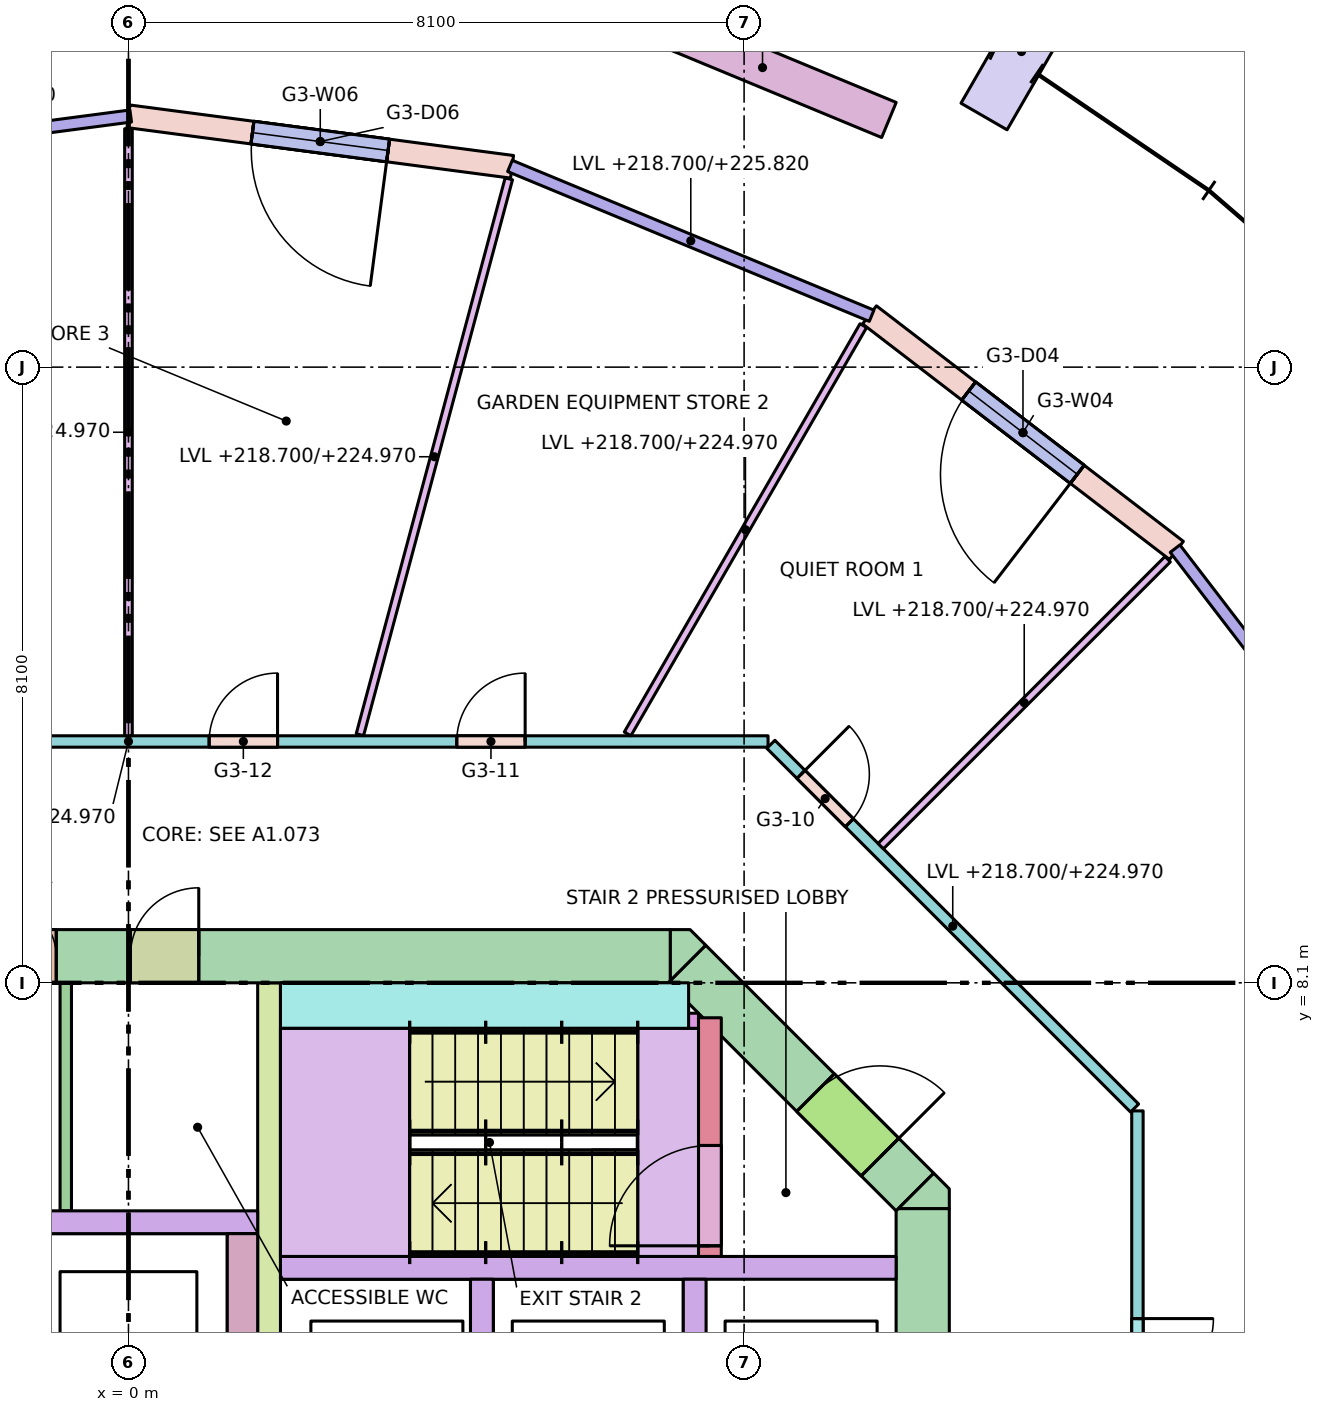
"""IFC4 building model, lengths in metres.
Left out: names, types, materials, properties, quantities, classifications, styles, units other than length and angle.
Written with IfcOpenShell. Run it as: python <this file> out.ifc"""

import sys

from ifc_helpers import new_model, si_unit, direction, frame, frame_2d, origin, origin_2d, place, context, subcontext, project, spatial, polyline, rectangle, outline, extrude, element, fill, save


model = new_model("IFC4")
c1 = context("Model", 3, precision=1e-05, world=origin(), true_north=direction((0.0, 1.0)))
c2 = subcontext(c1, "Body", "Model", "MODEL_VIEW")
j1 = project(units=[si_unit("LENGTHUNIT", "METRE"), si_unit("PLANEANGLEUNIT", "RADIAN")], contexts=[c1])
p1 = place(None, origin())
s1 = spatial("IfcSite", under=j1, at=p1, CompositionType="ELEMENT")
p2 = place(p1, origin())
s2 = spatial("IfcBuilding", under=s1, at=p2, CompositionType="ELEMENT")
p3 = place(p2, frame((0.0, 0.0, 218.7)))
s3 = spatial("IfcBuildingStorey", under=s2, at=p3, CompositionType="ELEMENT", Elevation=218.7)
p4 = place(p3, frame((11.505, 19.927, 0.067), z_axis=(0.066927607381, 0.115974555477, 0.990994751677), x_axis=(-0.866123480438, 0.499830087764, 0.0)))
e1 = element("IfcColumn", 1, at=p4, inside=s3, PredefinedType="COLUMN", context=c2, shape_type="SweptSolid", body=[
    extrude(rectangle(XDim=0.7, YDim=1.0, at=origin_2d()), origin(), (0.0, 0.0, 1.0), 7.332),
])
p5 = place(p3, frame((-7.13, 8.45, -0.28), z_axis=(0.0, 0.0, 1.0), x_axis=(1.0, 0.0, 0.0)))
e2 = element("IfcWall", 2, at=p5, inside=s3, PredefinedType="SHEAR", context=c2, shape_type="SweptSolid", body=[
    extrude(rectangle(XDim=14.26, YDim=0.7, at=frame_2d((7.13, 0.0))), origin(), (0.0, 0.0, 1.0), 7.4),
])
p6 = place(p5, frame((5.48, 0.0, 0.28)))
e3 = element("IfcOpeningElement", 3, at=p6, cuts=e2, PredefinedType="OPENING", context=c2, shape_type="SweptSolid", body=[
    extrude(rectangle(XDim=0.7, YDim=2.1, at=frame_2d((0.35, 1.05))), frame((0.0, 0.36, 0.0), z_axis=(0.0, -1.0, 0.0), x_axis=(1.0, 0.0, 0.0)), (0.0, 0.0, 1.0), 0.72),
])
p7 = place(p5, frame((7.155, 0.0, 0.28)))
e4 = element("IfcOpeningElement", 4, at=p7, cuts=e2, PredefinedType="OPENING", context=c2, shape_type="SweptSolid", body=[
    extrude(rectangle(XDim=0.9, YDim=2.1, at=frame_2d((0.45, 1.05))), frame((0.0, 0.36, 0.0), z_axis=(0.0, -1.0, 0.0), x_axis=(1.0, 0.0, 0.0)), (0.0, 0.0, 1.0), 0.72),
])
p8 = place(p3, frame((10.45, -5.13, -0.28), z_axis=(0.0, 0.0, 1.0), x_axis=(0.0, 1.0, 0.0)))
e5 = element("IfcWall", 5, at=p8, inside=s3, PredefinedType="SHEAR", context=c2, shape_type="SweptSolid", body=[
    extrude(rectangle(XDim=10.26, YDim=0.7, at=frame_2d((5.13, 0.0))), origin(), (0.0, 0.0, 1.0), 7.4),
])
p9 = place(p8, frame((4.13, 0.0, 0.28)))
e6 = element("IfcOpeningElement", 6, at=p9, cuts=e5, PredefinedType="OPENING", context=c2, shape_type="SweptSolid", body=[
    extrude(rectangle(XDim=2.0, YDim=2.1, at=frame_2d((1.0, 1.05))), frame((0.0, 0.36, 0.0), z_axis=(0.0, -1.0, 0.0), x_axis=(1.0, 0.0, 0.0)), (0.0, 0.0, 1.0), 0.72),
])
p10 = place(p3, frame((7.347, 8.347, -0.28), z_axis=(0.0, 0.0, 1.0), x_axis=(0.707106781187, -0.707106781187, 0.0)))
e7 = element("IfcWall", 7, at=p10, inside=s3, PredefinedType="SHEAR", context=c2, shape_type="SweptSolid", body=[
    extrude(rectangle(XDim=4.243, YDim=0.7, at=frame_2d((2.121, 0.0))), origin(), (0.0, 0.0, 1.0), 7.4),
])
p11 = place(p10, frame((2.393, 0.0, 0.28)))
e8 = element("IfcOpeningElement", 8, at=p11, cuts=e7, PredefinedType="OPENING", context=c2, shape_type="SweptSolid", body=[
    extrude(rectangle(XDim=1.2, YDim=2.1, at=frame_2d((0.6, 1.05))), frame((0.0, 0.36, 0.0), z_axis=(0.0, -1.0, 0.0), x_axis=(1.0, 0.0, 0.0)), (0.0, 0.0, 1.0), 0.72),
])
p12 = place(p3, frame((0.0, 0.0, -0.28)))
e9 = element("IfcWall", 9, at=p12, inside=s3, PredefinedType="SHEAR", context=c2, shape_type="SweptSolid", body=[
    extrude(outline(polyline([(10.8, 5.39), (10.8, 5.13), (10.8, 5.13), (10.13, 5.13), (10.595, 5.595), (10.595, 5.595), (10.595, 5.595), (10.8, 5.39)])), origin(), (0.0, 0.0, 1.0), 7.4),
])
p13 = place(p3, frame((0.0, 0.0, -0.28)))
e10 = element("IfcWall", 10, at=p13, inside=s3, PredefinedType="SHEAR", context=c2, shape_type="SweptSolid", body=[
    extrude(outline(polyline([(7.39, 8.8), (7.595, 8.595), (7.595, 8.595), (7.595, 8.595), (7.13, 8.13), (7.13, 8.8), (7.13, 8.8), (7.39, 8.8)])), origin(), (0.0, 0.0, 1.0), 7.4),
])
p14 = place(p3, frame((2.0, 4.35, 0.0), z_axis=(0.0, 0.0, 1.0), x_axis=(1.0, 0.0, 0.0)))
e11 = element("IfcWall", 11, at=p14, inside=s3, PredefinedType="SOLIDWALL", context=c2, shape_type="SweptSolid", body=[
    extrude(rectangle(XDim=8.1, YDim=0.3, at=frame_2d((4.05, 0.0))), origin(), (0.0, 0.0, 1.0), 7.12),
])
for number, where, z_axis, x_axis in (
    (12, (4.65, 1.8, 0.0), (0.0, 0.0, 1.0), (0.0, 1.0, 0.0)),
    (13, (7.45, 1.8, 0.0), (0.0, 0.0, 1.0), (0.0, 1.0, 0.0)),
):
    element("IfcWall", number, at=place(p3, frame(where, z_axis=z_axis, x_axis=x_axis)), inside=s3, PredefinedType="SOLIDWALL", context=c2, shape_type="SweptSolid", body=[
        extrude(rectangle(XDim=2.4, YDim=0.3, at=frame_2d((1.2, 0.0))), origin(), (0.0, 0.0, 1.0), 7.12),
    ])
p15 = place(p3, frame((1.85, 1.5, 0.0), z_axis=(0.0, 0.0, 1.0), x_axis=(0.0, 1.0, 0.0)))
e14 = element("IfcWall", 14, at=p15, inside=s3, PredefinedType="SHEAR", context=c2, shape_type="SweptSolid", body=[
    extrude(rectangle(XDim=6.6, YDim=0.3, at=frame_2d((3.3, 0.0))), origin(), (0.0, 0.0, 1.0), 7.12),
])
p16 = place(p3, frame((1.5, 1.8, 0.0), z_axis=(0.0, 0.0, 1.0), x_axis=(0.0, 1.0, 0.0)))
e15 = element("IfcWall", 15, at=p16, inside=s3, PredefinedType="SOLIDWALL", context=c2, shape_type="SweptSolid", body=[
    extrude(rectangle(XDim=3.0, YDim=0.4, at=frame_2d((1.5, 0.0))), origin(), (0.0, 0.0, 1.0), 7.12),
])
p17 = place(p3, frame((-1.7, 4.95, 0.0), z_axis=(0.0, 0.0, 1.0), x_axis=(1.0, 0.0, 0.0)))
e16 = element("IfcWall", 16, at=p17, inside=s3, PredefinedType="SOLIDWALL", context=c2, shape_type="SweptSolid", body=[
    extrude(rectangle(XDim=3.4, YDim=0.3, at=frame_2d((1.7, 0.0))), origin(), (0.0, 0.0, 1.0), 7.12),
])
p18 = place(p3, frame((7.65, 4.5, 0.0), z_axis=(0.0, 0.0, 1.0), x_axis=(0.0, 1.0, 0.0)))
e17 = element("IfcWall", 17, at=p18, inside=s3, PredefinedType="SHEAR", context=c2, shape_type="SweptSolid", body=[
    extrude(rectangle(XDim=3.14, YDim=0.3, at=frame_2d((1.57, 0.0))), origin(), (0.0, 0.0, 1.0), 7.12),
])
p19 = place(p18, frame((0.14, 0.0, 0.0)))
e18 = element("IfcOpeningElement", 18, at=p19, cuts=e17, PredefinedType="OPENING", context=c2, shape_type="SweptSolid", body=[
    extrude(rectangle(XDim=1.32, YDim=2.1, at=frame_2d((0.66, 1.05))), frame((0.0, 0.16, 0.0), z_axis=(0.0, -1.0, 0.0), x_axis=(1.0, 0.0, 0.0)), (0.0, 0.0, 1.0), 0.32),
])
p20 = place(p3, frame((2.0, 7.8, 0.0), z_axis=(0.0, 0.0, 1.0), x_axis=(1.0, 0.0, 0.0)))
e19 = element("IfcWall", 19, at=p20, inside=s3, PredefinedType="SHEAR", context=c2, shape_type="SweptSolid", body=[
    extrude(rectangle(XDim=5.37, YDim=0.6, at=frame_2d((2.685, 0.0))), origin(), (0.0, 0.0, 1.0), 7.12),
])
p21 = place(p3, frame((6.9, 7.6, 0.0), z_axis=(0.0, 0.0, 1.0), x_axis=(1.0, 0.0, 0.0)))
e20 = element("IfcWall", 20, at=p21, inside=s3, PredefinedType="SHEAR", context=c2, shape_type="SweptSolid", body=[
    extrude(rectangle(XDim=0.6, YDim=0.2, at=frame_2d((0.3, 0.0))), origin(), (0.0, 0.0, 1.0), 7.12),
])
p22 = place(p3, frame((13.789, 13.789, 0.0), z_axis=(0.0, 0.0, 1.0), x_axis=(-0.79335619014, 0.608757714995, 0.0)))
e21 = element("IfcWall", 21, at=p22, inside=s3, PredefinedType="STANDARD", context=c2, shape_type="SweptSolid", body=[
    extrude(rectangle(XDim=5.091, YDim=0.3, at=frame_2d((2.545, 0.0))), origin(), (0.0, 0.0, 1.0), 7.12),
])
p23 = place(p22, frame((1.645, 0.0, 0.0)))
e22 = element("IfcOpeningElement", 22, at=p23, cuts=e21, PredefinedType="OPENING", context=c2, shape_type="SweptSolid", body=[
    extrude(rectangle(XDim=1.8, YDim=2.4, at=frame_2d((0.9, 1.2))), frame((0.0, 0.16, 0.0), z_axis=(0.0, -1.0, 0.0), x_axis=(1.0, 0.0, 0.0)), (0.0, 0.0, 1.0), 0.32),
])
p24 = place(p22, frame((1.645, 0.0, 2.8)))
e23 = element("IfcOpeningElement", 23, at=p24, cuts=e21, PredefinedType="OPENING", context=c2, shape_type="SweptSolid", body=[
    extrude(rectangle(XDim=1.8, YDim=4.1, at=frame_2d((0.9, 2.05))), frame((0.0, 0.16, 0.0), z_axis=(0.0, -1.0, 0.0), x_axis=(1.0, 0.0, 0.0)), (0.0, 0.0, 1.0), 0.32),
])
p25 = place(p3, frame((5.047, 18.836, 0.0), z_axis=(0.0, 0.0, 1.0), x_axis=(-0.99144890792, 0.130495451964, 0.0)))
e24 = element("IfcWall", 24, at=p25, inside=s3, PredefinedType="STANDARD", context=c2, shape_type="SweptSolid", body=[
    extrude(rectangle(XDim=5.091, YDim=0.3, at=frame_2d((2.545, 0.0))), origin(), (0.0, 0.0, 1.0), 7.12),
])
p26 = place(p25, frame((1.645, 0.0, 0.0)))
e25 = element("IfcOpeningElement", 25, at=p26, cuts=e24, PredefinedType="OPENING", context=c2, shape_type="SweptSolid", body=[
    extrude(rectangle(XDim=1.8, YDim=2.4, at=frame_2d((0.9, 1.2))), frame((0.0, 0.16, 0.0), z_axis=(0.0, -1.0, 0.0), x_axis=(1.0, 0.0, 0.0)), (0.0, 0.0, 1.0), 0.32),
])
p27 = place(p25, frame((1.645, 0.0, 2.8)))
e26 = element("IfcOpeningElement", 26, at=p27, cuts=e24, PredefinedType="OPENING", context=c2, shape_type="SweptSolid", body=[
    extrude(rectangle(XDim=1.8, YDim=4.1, at=frame_2d((0.9, 2.05))), frame((0.0, 0.16, 0.0), z_axis=(0.0, -1.0, 0.0), x_axis=(1.0, 0.0, 0.0)), (0.0, 0.0, 1.0), 0.32),
])
p28 = place(p3, frame((10.006, 19.452, 0.0), z_axis=(0.0, 0.0, 1.0), x_axis=(-0.923885420167, 0.382669217998, 0.0)))
e27 = element("IfcWall", 27, at=p28, inside=s3, PredefinedType="PARAPET", context=c2, shape_type="SweptSolid", body=[
    extrude(rectangle(XDim=3.6, YDim=0.5, at=frame_2d((1.8, 0.0))), origin(), (0.0, 0.0, 1.0), 0.9),
])
p29 = place(p3, frame((-0.825, 5.1, 0.0), z_axis=(0.0, 0.0, 1.0), x_axis=(0.0, 1.0, 0.0)))
e28 = element("IfcWall", 28, at=p29, inside=s3, PredefinedType="PARTITIONING", context=c2, shape_type="SweptSolid", body=[
    extrude(rectangle(XDim=3.0, YDim=0.15, at=frame_2d((1.5, 0.0))), origin(), (0.0, 0.0, 1.0), 7.12),
])
p30 = place(p3, frame((-8.415, 11.275, 0.0), z_axis=(0.0, 0.0, 1.0), x_axis=(1.0, 0.0, 0.0)))
e29 = element("IfcWall", 29, at=p30, inside=s3, PredefinedType="PARTITIONING", context=c2, shape_type="SweptSolid", body=[
    extrude(rectangle(XDim=16.83, YDim=0.15, at=frame_2d((8.415, 0.0))), origin(), (0.0, 0.0, 1.0), 6.27),
])
p31 = place(p30, frame((4.256, 0.0, 0.0)))
e30 = element("IfcOpeningElement", 30, at=p31, cuts=e29, PredefinedType="OPENING", context=c2, shape_type="SweptSolid", body=[
    extrude(rectangle(XDim=1.8, YDim=2.1, at=frame_2d((0.9, 1.05))), frame((0.0, 0.085, 0.0), z_axis=(0.0, -1.0, 0.0), x_axis=(1.0, 0.0, 0.0)), (0.0, 0.0, 1.0), 0.17),
])
p32 = place(p30, frame((12.734, 0.0, 0.0)))
e31 = element("IfcOpeningElement", 31, at=p32, cuts=e29, PredefinedType="OPENING", context=c2, shape_type="SweptSolid", body=[
    extrude(rectangle(XDim=0.9, YDim=2.1, at=frame_2d((0.45, 1.05))), frame((0.0, 0.085, 0.0), z_axis=(0.0, -1.0, 0.0), x_axis=(1.0, 0.0, 0.0)), (0.0, 0.0, 1.0), 0.17),
])
p33 = place(p30, frame((9.477, 0.0, 0.0)))
e32 = element("IfcOpeningElement", 32, at=p33, cuts=e29, PredefinedType="OPENING", context=c2, shape_type="SweptSolid", body=[
    extrude(rectangle(XDim=0.9, YDim=2.1, at=frame_2d((0.45, 1.05))), frame((0.0, 0.085, 0.0), z_axis=(0.0, -1.0, 0.0), x_axis=(1.0, 0.0, 0.0)), (0.0, 0.0, 1.0), 0.17),
])
p34 = place(p3, frame((8.452, 11.238, 0.0), z_axis=(0.0, 0.0, 1.0), x_axis=(0.707106781187, -0.707106781187, 0.0)))
e33 = element("IfcWall", 33, at=p34, inside=s3, PredefinedType="PARTITIONING", context=c2, shape_type="SweptSolid", body=[
    extrude(rectangle(XDim=6.768, YDim=0.15, at=frame_2d((3.384, 0.0))), origin(), (0.0, 0.0, 1.0), 6.27),
])
p35 = place(p34, frame((0.56, 0.0, 0.0)))
e34 = element("IfcOpeningElement", 34, at=p35, cuts=e33, PredefinedType="OPENING", context=c2, shape_type="SweptSolid", body=[
    extrude(rectangle(XDim=0.9, YDim=2.1, at=frame_2d((0.45, 1.05))), frame((0.0, 0.085, 0.0), z_axis=(0.0, -1.0, 0.0), x_axis=(1.0, 0.0, 0.0)), (0.0, 0.0, 1.0), 0.17),
])
p36 = place(p3, frame((13.275, 6.415, 0.0), z_axis=(0.0, 0.0, 1.0), x_axis=(0.0, -1.0, 0.0)))
e35 = element("IfcWall", 35, at=p36, inside=s3, PredefinedType="PARTITIONING", context=c2, shape_type="SweptSolid", body=[
    extrude(rectangle(XDim=12.83, YDim=0.15, at=frame_2d((6.415, 0.0))), origin(), (0.0, 0.0, 1.0), 6.27),
])
p37 = place(p36, frame((9.098, 0.0, 0.0)))
e36 = element("IfcOpeningElement", 36, at=p37, cuts=e35, PredefinedType="OPENING", context=c2, shape_type="SweptSolid", body=[
    extrude(rectangle(XDim=1.0, YDim=2.1, at=frame_2d((0.5, 1.05))), frame((0.0, 0.085, 0.0), z_axis=(0.0, -1.0, 0.0), x_axis=(1.0, 0.0, 0.0)), (0.0, 0.0, 1.0), 0.17),
])
p38 = place(p36, frame((2.733, 0.0, 0.0)))
e37 = element("IfcOpeningElement", 37, at=p38, cuts=e35, PredefinedType="OPENING", context=c2, shape_type="SweptSolid", body=[
    extrude(rectangle(XDim=1.0, YDim=2.1, at=frame_2d((0.5, 1.05))), frame((0.0, 0.085, 0.0), z_axis=(0.0, -1.0, 0.0), x_axis=(1.0, 0.0, 0.0)), (0.0, 0.0, 1.0), 0.17),
])
p39 = place(p3, frame((9.898, 9.898, 0.0), z_axis=(0.0, 0.0, 1.0), x_axis=(0.707106781187, 0.707106781187, 0.0)))
e38 = element("IfcWall", 38, at=p39, inside=s3, PredefinedType="PARTITIONING", context=c2, shape_type="SweptSolid", body=[
    extrude(rectangle(XDim=5.339, YDim=0.1, at=frame_2d((2.669, 0.0))), origin(), (0.0, 0.0, 1.0), 6.27),
])
p40 = place(p3, frame((6.567, 11.375, 0.0), z_axis=(0.0, 0.0, 1.0), x_axis=(0.500004114527, 0.866023028248, 0.0)))
e39 = element("IfcWall", 39, at=p40, inside=s3, PredefinedType="PARTITIONING", context=c2, shape_type="SweptSolid", body=[
    extrude(rectangle(XDim=6.203, YDim=0.1, at=frame_2d((3.101, 0.0))), origin(), (0.0, 0.0, 1.0), 6.27),
])
p41 = place(p3, frame((3.045, 11.364, 0.0), z_axis=(0.0, 0.0, 1.0), x_axis=(0.25879840648, 0.965931356155, 0.0)))
e40 = element("IfcWall", 40, at=p41, inside=s3, PredefinedType="PARTITIONING", context=c2, shape_type="SweptSolid", body=[
    extrude(rectangle(XDim=7.572, YDim=0.1, at=frame_2d((3.786, 0.0))), origin(), (0.0, 0.0, 1.0), 6.27),
])
p42 = place(p3, frame((0.0, 11.35, 0.0), z_axis=(0.0, 0.0, 1.0), x_axis=(0.0, 1.0, 0.0)))
e41 = element("IfcWall", 41, at=p42, inside=s3, PredefinedType="PARTITIONING", context=c2, shape_type="SweptSolid", body=[
    extrude(rectangle(XDim=7.987, YDim=0.1, at=frame_2d((3.993, 0.0))), origin(), (0.0, 0.0, 1.0), 6.27),
])
p43 = place(p23, origin())
e42 = element("IfcDoor", 42, at=p43, inside=s3, OperationType="SINGLE_SWING_LEFT", PredefinedType="DOOR", context=c2, shape_type="SweptSolid", body=[
    extrude(rectangle(XDim=1.8, YDim=2.4, at=frame_2d((0.9, 1.2))), frame((0.0, 0.025, 0.0), z_axis=(0.0, -1.0, 0.0), x_axis=(1.0, 0.0, 0.0)), (0.0, 0.0, 1.0), 0.05),
])
fill(e22, e42)
p44 = place(p24, origin())
e43 = element("IfcWindow", 43, at=p44, inside=s3, PartitioningType="SINGLE_PANEL", PredefinedType="WINDOW", context=c2, shape_type="SweptSolid", body=[
    extrude(rectangle(XDim=1.8, YDim=4.1, at=frame_2d((0.9, 2.05))), frame((0.0, 0.03, 0.0), z_axis=(0.0, -1.0, 0.0), x_axis=(1.0, 0.0, 0.0)), (0.0, 0.0, 1.0), 0.06),
])
fill(e23, e43)
p45 = place(p26, origin())
e44 = element("IfcDoor", 44, at=p45, inside=s3, OperationType="SINGLE_SWING_LEFT", PredefinedType="DOOR", context=c2, shape_type="SweptSolid", body=[
    extrude(rectangle(XDim=1.8, YDim=2.4, at=frame_2d((0.9, 1.2))), frame((0.0, 0.025, 0.0), z_axis=(0.0, -1.0, 0.0), x_axis=(1.0, 0.0, 0.0)), (0.0, 0.0, 1.0), 0.05),
])
fill(e25, e44)
p46 = place(p27, origin())
e45 = element("IfcWindow", 45, at=p46, inside=s3, PartitioningType="SINGLE_PANEL", PredefinedType="WINDOW", context=c2, shape_type="SweptSolid", body=[
    extrude(rectangle(XDim=1.8, YDim=4.1, at=frame_2d((0.9, 2.05))), frame((0.0, 0.03, 0.0), z_axis=(0.0, -1.0, 0.0), x_axis=(1.0, 0.0, 0.0)), (0.0, 0.0, 1.0), 0.06),
])
fill(e26, e45)
p47 = place(p19, origin())
e46 = element("IfcDoor", 46, at=p47, inside=s3, OperationType="DOUBLE_DOOR_SINGLE_SWING", PredefinedType="DOOR", context=c2, shape_type="SweptSolid", body=[
    extrude(rectangle(XDim=1.32, YDim=2.1, at=frame_2d((0.66, 1.05))), frame((0.0, 0.025, 0.0), z_axis=(0.0, -1.0, 0.0), x_axis=(1.0, 0.0, 0.0)), (0.0, 0.0, 1.0), 0.05),
])
fill(e18, e46)
p48 = place(p11, origin())
e47 = element("IfcDoor", 47, at=p48, inside=s3, OperationType="SINGLE_SWING_RIGHT", PredefinedType="DOOR", context=c2, shape_type="SweptSolid", body=[
    extrude(rectangle(XDim=1.2, YDim=2.1, at=frame_2d((0.6, 1.05))), frame((0.0, 0.025, 0.0), z_axis=(0.0, -1.0, 0.0), x_axis=(1.0, 0.0, 0.0)), (0.0, 0.0, 1.0), 0.05),
])
fill(e8, e47)
p49 = place(p6, origin())
e48 = element("IfcDoor", 48, at=p49, inside=s3, OperationType="SINGLE_SWING_LEFT", PredefinedType="DOOR", context=c2, shape_type="SweptSolid", body=[
    extrude(rectangle(XDim=0.7, YDim=2.1, at=frame_2d((0.35, 1.05))), frame((0.0, 0.025, 0.0), z_axis=(0.0, -1.0, 0.0), x_axis=(1.0, 0.0, 0.0)), (0.0, 0.0, 1.0), 0.05),
])
fill(e3, e48)
p50 = place(p7, origin())
e49 = element("IfcDoor", 49, at=p50, inside=s3, OperationType="SINGLE_SWING_RIGHT", PredefinedType="DOOR", context=c2, shape_type="SweptSolid", body=[
    extrude(rectangle(XDim=0.9, YDim=2.1, at=frame_2d((0.45, 1.05))), frame((0.0, 0.025, 0.0), z_axis=(0.0, -1.0, 0.0), x_axis=(1.0, 0.0, 0.0)), (0.0, 0.0, 1.0), 0.05),
])
fill(e4, e49)
p51 = place(p38, origin())
e50 = element("IfcDoor", 50, at=p51, inside=s3, OperationType="SINGLE_SWING_LEFT", PredefinedType="DOOR", context=c2, shape_type="SweptSolid", body=[
    extrude(rectangle(XDim=1.0, YDim=2.1, at=frame_2d((0.5, 1.05))), frame((0.0, 0.025, 0.0), z_axis=(0.0, -1.0, 0.0), x_axis=(1.0, 0.0, 0.0)), (0.0, 0.0, 1.0), 0.05),
])
fill(e37, e50)
p52 = place(p35, origin())
e51 = element("IfcDoor", 51, at=p52, inside=s3, OperationType="SINGLE_SWING_LEFT", PredefinedType="DOOR", context=c2, shape_type="SweptSolid", body=[
    extrude(rectangle(XDim=0.9, YDim=2.1, at=frame_2d((0.45, 1.05))), frame((0.0, 0.025, 0.0), z_axis=(0.0, -1.0, 0.0), x_axis=(1.0, 0.0, 0.0)), (0.0, 0.0, 1.0), 0.05),
])
fill(e34, e51)
p53 = place(p32, origin())
e52 = element("IfcDoor", 52, at=p53, inside=s3, OperationType="SINGLE_SWING_RIGHT", PredefinedType="DOOR", context=c2, shape_type="SweptSolid", body=[
    extrude(rectangle(XDim=0.9, YDim=2.1, at=frame_2d((0.45, 1.05))), frame((0.0, 0.025, 0.0), z_axis=(0.0, -1.0, 0.0), x_axis=(1.0, 0.0, 0.0)), (0.0, 0.0, 1.0), 0.05),
])
fill(e31, e52)
p54 = place(p33, origin())
e53 = element("IfcDoor", 53, at=p54, inside=s3, OperationType="SINGLE_SWING_RIGHT", PredefinedType="DOOR", context=c2, shape_type="SweptSolid", body=[
    extrude(rectangle(XDim=0.9, YDim=2.1, at=frame_2d((0.45, 1.05))), frame((0.0, 0.025, 0.0), z_axis=(0.0, -1.0, 0.0), x_axis=(1.0, 0.0, 0.0)), (0.0, 0.0, 1.0), 0.05),
])
fill(e32, e53)
save(model, sys.argv[1])
